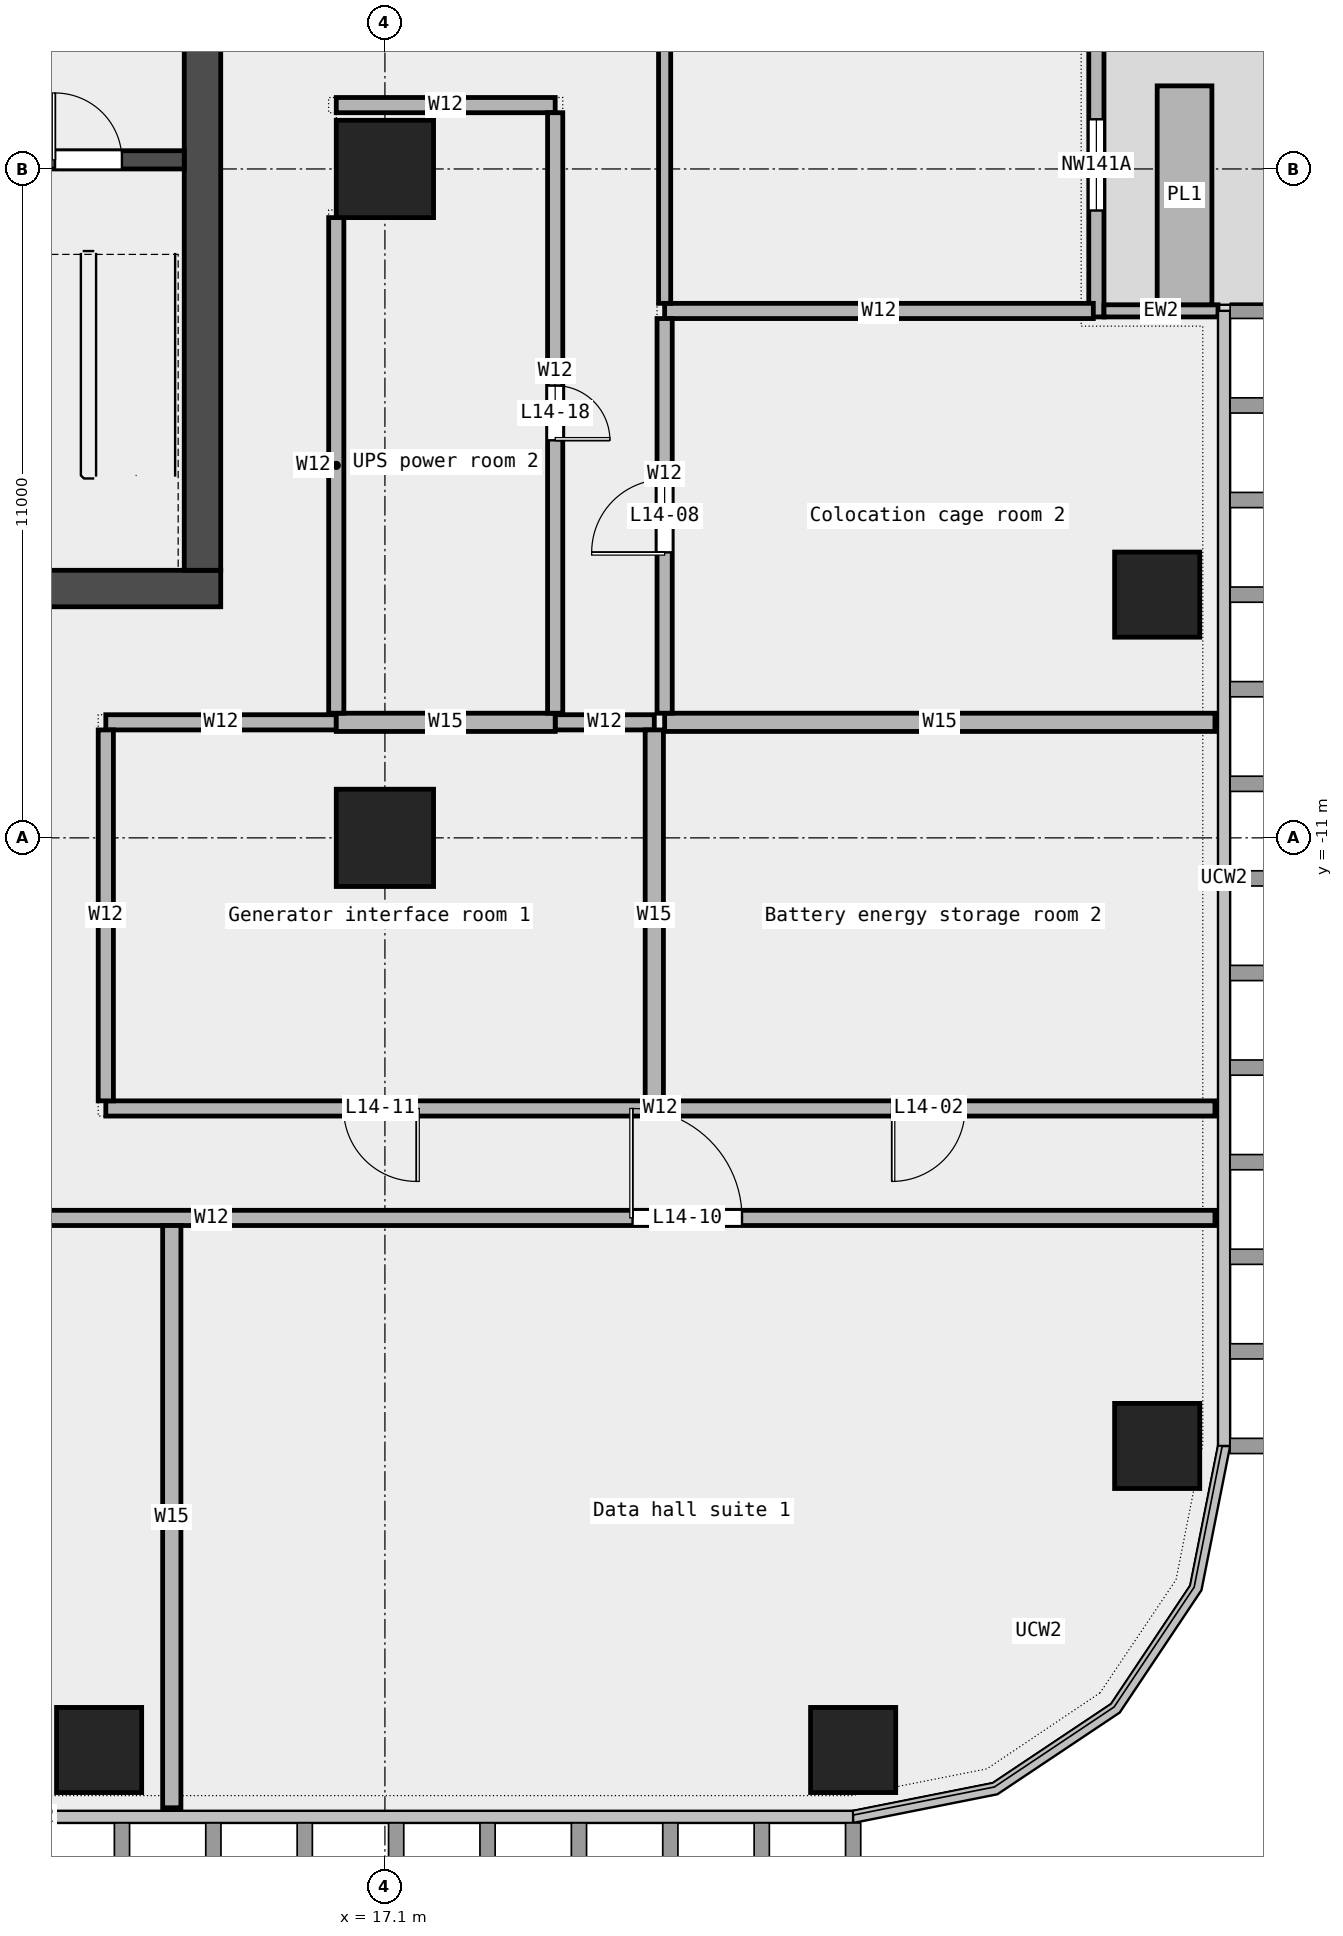
"""IFC4 building model, lengths in metres.
Left out: names, types, materials, properties, quantities, classifications, styles, units other than length and angle.
Written with IfcOpenShell. Run it as: python <this file> out.ifc"""

import sys

from ifc_helpers import new_model, si_unit, direction, frame, frame_2d, origin, origin_2d, place, context, subcontext, project, spatial, rectangle, extrude, element, fill, save


model = new_model("IFC4")
c1 = context("Model", 3, precision=1e-05, world=origin(), true_north=direction((0.0, 1.0)))
c2 = subcontext(c1, "Body", "Model", "MODEL_VIEW")
j1 = project(units=[si_unit("LENGTHUNIT", "METRE"), si_unit("PLANEANGLEUNIT", "RADIAN")], contexts=[c1])
p1 = place(None, origin())
s1 = spatial("IfcSite", under=j1, at=p1, CompositionType="ELEMENT")
p2 = place(p1, origin())
s2 = spatial("IfcBuilding", under=s1, at=p2, CompositionType="ELEMENT")
p3 = place(p2, frame((0.0, 0.0, 74.2)))
s3 = spatial("IfcBuildingStorey", under=s2, at=p3, CompositionType="ELEMENT", Elevation=74.2)
for number, where, z_axis, x_axis in (
    (1, (12.4, -26.0, 0.0), (0.0, 0.0, 1.0), (1.0, 0.0, 0.0)),
    (2, (24.8, -26.0, 0.0), (0.0, 0.0, 1.0), (1.0, 0.0, 0.0)),
    (3, (29.8, -21.0, 0.0), (0.0, 0.0, 1.0), (1.0, 0.0, 0.0)),
    (4, (29.8, -7.0, 0.0), (0.0, 0.0, 1.0), (1.0, 0.0, 0.0)),
):
    element("IfcColumn", number, at=place(p3, frame(where, z_axis=z_axis, x_axis=x_axis)), inside=s3, PredefinedType="COLUMN", context=c2, shape_type="SweptSolid", body=[
        extrude(rectangle(XDim=1.4, YDim=1.4, at=origin_2d()), origin(), (0.0, 0.0, 1.0), 4.35),
    ])
for number, where, z_axis, x_axis in (
    (5, (17.1, -11.0, 0.0), (0.0, 0.0, 1.0), (1.0, 0.0, 0.0)),
    (6, (17.1, 0.0, 0.0), (0.0, 0.0, 1.0), (1.0, 0.0, 0.0)),
):
    element("IfcColumn", number, at=place(p3, frame(where, z_axis=z_axis, x_axis=x_axis)), inside=s3, PredefinedType="COLUMN", context=c2, shape_type="SweptSolid", body=[
        extrude(rectangle(XDim=1.6, YDim=1.6, at=origin_2d()), origin(), (0.0, 0.0, 1.0), 4.35),
    ])
p4 = place(p3, frame((28.8, -2.433, 0.0), z_axis=(0.0, 0.0, 1.0), x_axis=(0.0, 1.0, 0.0)))
e7 = element("IfcWall", 7, at=p4, inside=s3, PredefinedType="STANDARD", context=c2, shape_type="SweptSolid", body=[
    extrude(rectangle(XDim=14.2, YDim=0.25, at=frame_2d((7.1, 0.0))), origin(), (0.0, 0.0, 1.0), 4.35),
])
p5 = place(p4, frame((1.75, 0.0, 0.45)))
e8 = element("IfcOpeningElement", 8, at=p5, cuts=e7, PredefinedType="OPENING", context=c2, shape_type="SweptSolid", body=[
    extrude(rectangle(XDim=1.5, YDim=3.0, at=frame_2d((0.75, 1.5))), frame((0.0, 0.137, 0.0), z_axis=(0.0, -1.0, 0.0), x_axis=(1.0, 0.0, 0.0)), (0.0, 0.0, 1.0), 0.274),
])
p6 = place(p4, frame((6.25, 0.0, 0.0)))
e9 = element("IfcOpeningElement", 9, at=p6, cuts=e7, PredefinedType="OPENING", context=c2, shape_type="SweptSolid", body=[
    extrude(rectangle(XDim=1.8, YDim=2.4, at=frame_2d((0.9, 1.2))), frame((0.0, 0.137, 0.0), z_axis=(0.0, -1.0, 0.0), x_axis=(1.0, 0.0, 0.0)), (0.0, 0.0, 1.0), 0.274),
])
p7 = place(p4, frame((11.0, 0.0, 0.45)))
e10 = element("IfcOpeningElement", 10, at=p7, cuts=e7, PredefinedType="OPENING", context=c2, shape_type="SweptSolid", body=[
    extrude(rectangle(XDim=1.5, YDim=3.0, at=frame_2d((0.75, 1.5))), frame((0.0, 0.137, 0.0), z_axis=(0.0, -1.0, 0.0), x_axis=(1.0, 0.0, 0.0)), (0.0, 0.0, 1.0), 0.274),
])
p8 = place(p3, frame((30.8, -2.333, 0.0), z_axis=(0.0, 0.0, 1.0), x_axis=(-1.0, 0.0, 0.0)))
e11 = element("IfcWall", 11, at=p8, inside=s3, PredefinedType="STANDARD", context=c2, shape_type="SweptSolid", body=[
    extrude(rectangle(XDim=1.875, YDim=0.2, at=frame_2d((0.938, 0.0))), origin(), (0.0, 0.0, 1.0), 4.35),
])
p9 = place(p3, frame((30.25, -2.233, 0.0), z_axis=(0.0, 0.0, 1.0), x_axis=(0.0, 1.0, 0.0)))
e12 = element("IfcWall", 12, at=p9, inside=s3, PredefinedType="STANDARD", context=c2, shape_type="SweptSolid", body=[
    extrude(rectangle(XDim=3.6, YDim=0.9, at=frame_2d((1.8, 0.0))), origin(), (0.0, 0.0, 1.0), 0.7),
])
p10 = place(p3, frame((-2.255, -17.25, 0.0), z_axis=(0.0, 0.0, 1.0), x_axis=(1.0, 0.0, 0.0)))
e13 = element("IfcWall", 13, at=p10, inside=s3, PredefinedType="PARTITIONING", context=c2, shape_type="SweptSolid", body=[
    extrude(rectangle(XDim=33.005, YDim=0.25, at=frame_2d((16.502, 0.0))), origin(), (0.0, 0.0, 1.0), 4.35),
])
p11 = place(p10, frame((7.025, 0.0, 0.0)))
e14 = element("IfcOpeningElement", 14, at=p11, cuts=e13, PredefinedType="OPENING", context=c2, shape_type="SweptSolid", body=[
    extrude(rectangle(XDim=1.8, YDim=2.1, at=frame_2d((0.9, 1.05))), frame((0.0, 0.137, 0.0), z_axis=(0.0, -1.0, 0.0), x_axis=(1.0, 0.0, 0.0)), (0.0, 0.0, 1.0), 0.274),
])
p12 = place(p10, frame((23.427, 0.0, 0.0)))
e15 = element("IfcOpeningElement", 15, at=p12, cuts=e13, PredefinedType="OPENING", context=c2, shape_type="SweptSolid", body=[
    extrude(rectangle(XDim=1.8, YDim=2.1, at=frame_2d((0.9, 1.05))), frame((0.0, 0.137, 0.0), z_axis=(0.0, -1.0, 0.0), x_axis=(1.0, 0.0, 0.0)), (0.0, 0.0, 1.0), 0.274),
])
p13 = place(p3, frame((12.51, -15.45, 0.0), z_axis=(0.0, 0.0, 1.0), x_axis=(1.0, 0.0, 0.0)))
e16 = element("IfcWall", 16, at=p13, inside=s3, PredefinedType="PARTITIONING", context=c2, shape_type="SweptSolid", body=[
    extrude(rectangle(XDim=18.24, YDim=0.25, at=frame_2d((9.12, 0.0))), origin(), (0.0, 0.0, 1.0), 4.35),
])
p14 = place(p13, frame((12.93, 0.0, 0.0)))
e17 = element("IfcOpeningElement", 17, at=p14, cuts=e16, PredefinedType="OPENING", context=c2, shape_type="SweptSolid", body=[
    extrude(rectangle(XDim=1.2, YDim=2.1, at=frame_2d((0.6, 1.05))), frame((0.0, 0.137, 0.0), z_axis=(0.0, -1.0, 0.0), x_axis=(1.0, 0.0, 0.0)), (0.0, 0.0, 1.0), 0.274),
])
p15 = place(p13, frame((3.91, 0.0, 0.0)))
e18 = element("IfcOpeningElement", 18, at=p15, cuts=e16, PredefinedType="OPENING", context=c2, shape_type="SweptSolid", body=[
    extrude(rectangle(XDim=1.2, YDim=2.1, at=frame_2d((0.6, 1.05))), frame((0.0, 0.137, 0.0), z_axis=(0.0, -1.0, 0.0), x_axis=(1.0, 0.0, 0.0)), (0.0, 0.0, 1.0), 0.274),
])
p16 = place(p3, frame((12.51, -9.1, 0.0), z_axis=(0.0, 0.0, 1.0), x_axis=(1.0, 0.0, 0.0)))
e19 = element("IfcWall", 19, at=p16, inside=s3, PredefinedType="PARTITIONING", context=c2, shape_type="SweptSolid", body=[
    extrude(rectangle(XDim=3.79, YDim=0.25, at=frame_2d((1.895, 0.0))), origin(), (0.0, 0.0, 1.0), 4.35),
])
p17 = place(p3, frame((19.9, -9.1, 0.0), z_axis=(0.0, 0.0, 1.0), x_axis=(1.0, 0.0, 0.0)))
e20 = element("IfcWall", 20, at=p17, inside=s3, PredefinedType="PARTITIONING", context=c2, shape_type="SweptSolid", body=[
    extrude(rectangle(XDim=1.63, YDim=0.25, at=frame_2d((0.815, 0.0))), origin(), (0.0, 0.0, 1.0), 4.35),
])
p18 = place(p3, frame((16.3, -9.1, 0.0), z_axis=(0.0, 0.0, 1.0), x_axis=(1.0, 0.0, 0.0)))
e21 = element("IfcWall", 21, at=p18, inside=s3, PredefinedType="PARTITIONING", context=c2, shape_type="SweptSolid", body=[
    extrude(rectangle(XDim=3.6, YDim=0.3, at=frame_2d((1.8, 0.0))), origin(), (0.0, 0.0, 1.0), 4.35),
])
p19 = place(p3, frame((21.7, -9.1, 0.0), z_axis=(0.0, 0.0, 1.0), x_axis=(1.0, 0.0, 0.0)))
e22 = element("IfcWall", 22, at=p19, inside=s3, PredefinedType="PARTITIONING", context=c2, shape_type="SweptSolid", body=[
    extrude(rectangle(XDim=9.05, YDim=0.3, at=frame_2d((4.525, 0.0))), origin(), (0.0, 0.0, 1.0), 4.35),
])
p20 = place(p3, frame((21.7, -2.335, 0.0), z_axis=(0.0, 0.0, 1.0), x_axis=(1.0, 0.0, 0.0)))
e23 = element("IfcWall", 23, at=p20, inside=s3, PredefinedType="PARTITIONING", context=c2, shape_type="SweptSolid", body=[
    extrude(rectangle(XDim=7.05, YDim=0.25, at=frame_2d((3.525, 0.0))), origin(), (0.0, 0.0, 1.0), 4.35),
])
p21 = place(p3, frame((16.3, 1.05, 0.0), z_axis=(0.0, 0.0, 1.0), x_axis=(1.0, 0.0, 0.0)))
e24 = element("IfcWall", 24, at=p21, inside=s3, PredefinedType="PARTITIONING", context=c2, shape_type="SweptSolid", body=[
    extrude(rectangle(XDim=3.6, YDim=0.25, at=frame_2d((1.8, 0.0))), origin(), (0.0, 0.0, 1.0), 4.35),
])
p22 = place(p3, frame((12.51, -15.325, 0.0), z_axis=(0.0, 0.0, 1.0), x_axis=(0.0, 1.0, 0.0)))
e25 = element("IfcWall", 25, at=p22, inside=s3, PredefinedType="PARTITIONING", context=c2, shape_type="SweptSolid", body=[
    extrude(rectangle(XDim=6.1, YDim=0.25, at=frame_2d((3.05, 0.0))), origin(), (0.0, 0.0, 1.0), 4.35),
])
p23 = place(p3, frame((13.595, -26.95, 0.0), z_axis=(0.0, 0.0, 1.0), x_axis=(0.0, 1.0, 0.0)))
e26 = element("IfcWall", 26, at=p23, inside=s3, PredefinedType="PARTITIONING", context=c2, shape_type="SweptSolid", body=[
    extrude(rectangle(XDim=9.575, YDim=0.3, at=frame_2d((4.788, 0.0))), origin(), (0.0, 0.0, 1.0), 4.35),
])
p24 = place(p3, frame((16.3, -8.95, 0.0), z_axis=(0.0, 0.0, 1.0), x_axis=(0.0, 1.0, 0.0)))
e27 = element("IfcWall", 27, at=p24, inside=s3, PredefinedType="PARTITIONING", context=c2, shape_type="SweptSolid", body=[
    extrude(rectangle(XDim=8.15, YDim=0.25, at=frame_2d((4.075, 0.0))), origin(), (0.0, 0.0, 1.0), 4.35),
])
p25 = place(p3, frame((19.9, -8.95, 0.0), z_axis=(0.0, 0.0, 1.0), x_axis=(0.0, 1.0, 0.0)))
e28 = element("IfcWall", 28, at=p25, inside=s3, PredefinedType="PARTITIONING", context=c2, shape_type="SweptSolid", body=[
    extrude(rectangle(XDim=9.875, YDim=0.25, at=frame_2d((4.938, 0.0))), origin(), (0.0, 0.0, 1.0), 4.35),
])
p26 = place(p25, frame((4.488, 0.0, 0.0)))
e29 = element("IfcOpeningElement", 29, at=p26, cuts=e28, PredefinedType="OPENING", context=c2, shape_type="SweptSolid", body=[
    extrude(rectangle(XDim=0.9, YDim=2.1, at=frame_2d((0.45, 1.05))), frame((0.0, 0.137, 0.0), z_axis=(0.0, -1.0, 0.0), x_axis=(1.0, 0.0, 0.0)), (0.0, 0.0, 1.0), 0.274),
])
p27 = place(p3, frame((21.53, -15.325, 0.0), z_axis=(0.0, 0.0, 1.0), x_axis=(0.0, 1.0, 0.0)))
e30 = element("IfcWall", 30, at=p27, inside=s3, PredefinedType="PARTITIONING", context=c2, shape_type="SweptSolid", body=[
    extrude(rectangle(XDim=6.1, YDim=0.3, at=frame_2d((3.05, 0.0))), origin(), (0.0, 0.0, 1.0), 4.35),
])
p28 = place(p3, frame((21.7, -2.21, 0.0), z_axis=(0.0, 0.0, 1.0), x_axis=(0.0, 1.0, 0.0)))
e31 = element("IfcWall", 31, at=p28, inside=s3, PredefinedType="PARTITIONING", context=c2, shape_type="SweptSolid", body=[
    extrude(rectangle(XDim=17.485, YDim=0.2, at=frame_2d((8.742, 0.0))), origin(), (0.0, 0.0, 1.0), 4.35),
])
p29 = place(p28, frame((15.23, 0.0, 0.0)))
e32 = element("IfcOpeningElement", 32, at=p29, cuts=e31, PredefinedType="OPENING", context=c2, shape_type="SweptSolid", body=[
    extrude(rectangle(XDim=0.9, YDim=2.1, at=frame_2d((0.45, 1.05))), frame((0.0, 0.112, 0.0), z_axis=(0.0, -1.0, 0.0), x_axis=(1.0, 0.0, 0.0)), (0.0, 0.0, 1.0), 0.224),
])
p30 = place(p28, frame((6.188, 0.0, 0.0)))
e33 = element("IfcOpeningElement", 33, at=p30, cuts=e31, PredefinedType="OPENING", context=c2, shape_type="SweptSolid", body=[
    extrude(rectangle(XDim=1.5, YDim=2.1, at=frame_2d((0.75, 1.05))), frame((0.0, 0.112, 0.0), z_axis=(0.0, -1.0, 0.0), x_axis=(1.0, 0.0, 0.0)), (0.0, 0.0, 1.0), 0.224),
])
p31 = place(p3, frame((21.7, -8.95, 0.0), z_axis=(0.0, 0.0, 1.0), x_axis=(0.0, 1.0, 0.0)))
e34 = element("IfcWall", 34, at=p31, inside=s3, PredefinedType="PARTITIONING", context=c2, shape_type="SweptSolid", body=[
    extrude(rectangle(XDim=6.49, YDim=0.25, at=frame_2d((3.245, 0.0))), origin(), (0.0, 0.0, 1.0), 4.35),
])
p32 = place(p31, frame((2.645, 0.0, 0.0)))
e35 = element("IfcOpeningElement", 35, at=p32, cuts=e34, PredefinedType="OPENING", context=c2, shape_type="SweptSolid", body=[
    extrude(rectangle(XDim=1.2, YDim=2.1, at=frame_2d((0.6, 1.05))), frame((0.0, 0.137, 0.0), z_axis=(0.0, -1.0, 0.0), x_axis=(1.0, 0.0, 0.0)), (0.0, 0.0, 1.0), 0.274),
])
p33 = place(p3, frame((-14.4, -6.9, 0.0), z_axis=(0.0, 0.0, 1.0), x_axis=(1.0, 0.0, 0.0)))
e36 = element("IfcWall", 36, at=p33, inside=s3, PredefinedType="SHEAR", context=c2, shape_type="SweptSolid", body=[
    extrude(rectangle(XDim=28.8, YDim=0.6, at=frame_2d((14.4, 0.0))), origin(), (0.0, 0.0, 1.0), 4.5),
])
p34 = place(p33, frame((6.675, 0.0, 0.0)))
e37 = element("IfcOpeningElement", 37, at=p34, cuts=e36, PredefinedType="OPENING", context=c2, shape_type="SweptSolid", body=[
    extrude(rectangle(XDim=1.2, YDim=2.1, at=frame_2d((0.6, 1.05))), frame((0.0, 0.312, 0.0), z_axis=(0.0, -1.0, 0.0), x_axis=(1.0, 0.0, 0.0)), (0.0, 0.0, 1.0), 0.624),
])
p35 = place(p33, frame((11.837, 0.0, 0.0)))
e38 = element("IfcOpeningElement", 38, at=p35, cuts=e36, PredefinedType="OPENING", context=c2, shape_type="SweptSolid", body=[
    extrude(rectangle(XDim=1.0, YDim=2.1, at=frame_2d((0.5, 1.05))), frame((0.0, 0.312, 0.0), z_axis=(0.0, -1.0, 0.0), x_axis=(1.0, 0.0, 0.0)), (0.0, 0.0, 1.0), 0.624),
])
p36 = place(p33, frame((15.025, 0.0, 0.0)))
e39 = element("IfcOpeningElement", 39, at=p36, cuts=e36, PredefinedType="OPENING", context=c2, shape_type="SweptSolid", body=[
    extrude(rectangle(XDim=1.0, YDim=2.1, at=frame_2d((0.5, 1.05))), frame((0.0, 0.312, 0.0), z_axis=(0.0, -1.0, 0.0), x_axis=(1.0, 0.0, 0.0)), (0.0, 0.0, 1.0), 0.624),
])
p37 = place(p33, frame((18.75, 0.0, 0.0)))
e40 = element("IfcOpeningElement", 40, at=p37, cuts=e36, PredefinedType="OPENING", context=c2, shape_type="SweptSolid", body=[
    extrude(rectangle(XDim=1.8, YDim=2.1, at=frame_2d((0.9, 1.05))), frame((0.0, 0.312, 0.0), z_axis=(0.0, -1.0, 0.0), x_axis=(1.0, 0.0, 0.0)), (0.0, 0.0, 1.0), 0.624),
])
p38 = place(p33, frame((23.087, 0.0, 0.0)))
e41 = element("IfcOpeningElement", 41, at=p38, cuts=e36, PredefinedType="OPENING", context=c2, shape_type="SweptSolid", body=[
    extrude(rectangle(XDim=1.0, YDim=2.1, at=frame_2d((0.5, 1.05))), frame((0.0, 0.312, 0.0), z_axis=(0.0, -1.0, 0.0), x_axis=(1.0, 0.0, 0.0)), (0.0, 0.0, 1.0), 0.624),
])
p39 = place(p3, frame((14.1, -6.6, 0.0), z_axis=(0.0, 0.0, 1.0), x_axis=(0.0, 1.0, 0.0)))
e42 = element("IfcWall", 42, at=p39, inside=s3, PredefinedType="SHEAR", context=c2, shape_type="SweptSolid", body=[
    extrude(rectangle(XDim=19.5, YDim=0.6, at=frame_2d((9.75, 0.0))), origin(), (0.0, 0.0, 1.0), 4.5),
])
p40 = place(p39, frame((9.3, 0.0, 0.0)))
e43 = element("IfcOpeningElement", 43, at=p40, cuts=e42, PredefinedType="OPENING", context=c2, shape_type="SweptSolid", body=[
    extrude(rectangle(XDim=1.8, YDim=2.1, at=frame_2d((0.9, 1.05))), frame((0.0, 0.312, 0.0), z_axis=(0.0, -1.0, 0.0), x_axis=(1.0, 0.0, 0.0)), (0.0, 0.0, 1.0), 0.624),
])
p41 = place(p3, frame((10.65, 0.15, 0.0), z_axis=(0.0, 0.0, 1.0), x_axis=(1.0, 0.0, 0.0)))
e44 = element("IfcWall", 44, at=p41, inside=s3, PredefinedType="SOLIDWALL", context=c2, shape_type="SweptSolid", body=[
    extrude(rectangle(XDim=3.15, YDim=0.3, at=frame_2d((1.575, 0.0))), origin(), (0.0, 0.0, 1.0), 4.5),
])
p42 = place(p41, frame((1.025, 0.0, 0.0)))
e45 = element("IfcOpeningElement", 45, at=p42, cuts=e44, PredefinedType="OPENING", context=c2, shape_type="SweptSolid", body=[
    extrude(rectangle(XDim=1.1, YDim=2.1, at=frame_2d((0.55, 1.05))), frame((0.0, 0.162, 0.0), z_axis=(0.0, -1.0, 0.0), x_axis=(1.0, 0.0, 0.0)), (0.0, 0.0, 1.0), 0.324),
])
p43 = place(p5, origin())
e46 = element("IfcWindow", 46, at=p43, inside=s3, PartitioningType="SINGLE_PANEL", PredefinedType="WINDOW", context=c2, shape_type="SweptSolid", body=[
    extrude(rectangle(XDim=1.5, YDim=3.0, at=frame_2d((0.75, 1.5))), frame((0.0, 0.03, 0.0), z_axis=(0.0, -1.0, 0.0), x_axis=(1.0, 0.0, 0.0)), (0.0, 0.0, 1.0), 0.06),
])
fill(e8, e46)
p44 = place(p14, origin())
e47 = element("IfcDoor", 47, at=p44, inside=s3, OperationType="SINGLE_SWING_RIGHT", PredefinedType="DOOR", context=c2, shape_type="SweptSolid", body=[
    extrude(rectangle(XDim=1.2, YDim=2.1, at=frame_2d((0.6, 1.05))), frame((0.0, 0.025, 0.0), z_axis=(0.0, -1.0, 0.0), x_axis=(1.0, 0.0, 0.0)), (0.0, 0.0, 1.0), 0.05),
])
fill(e17, e47)
p45 = place(p32, origin())
e48 = element("IfcDoor", 48, at=p45, inside=s3, OperationType="SINGLE_SWING_LEFT", PredefinedType="DOOR", context=c2, shape_type="SweptSolid", body=[
    extrude(rectangle(XDim=1.2, YDim=2.1, at=frame_2d((0.6, 1.05))), frame((0.0, 0.025, 0.0), z_axis=(0.0, -1.0, 0.0), x_axis=(1.0, 0.0, 0.0)), (0.0, 0.0, 1.0), 0.05),
])
fill(e35, e48)
p46 = place(p12, origin())
e49 = element("IfcDoor", 49, at=p46, inside=s3, OperationType="DOUBLE_DOOR_SINGLE_SWING", PredefinedType="DOOR", context=c2, shape_type="SweptSolid", body=[
    extrude(rectangle(XDim=1.8, YDim=2.1, at=frame_2d((0.9, 1.05))), frame((0.0, 0.025, 0.0), z_axis=(0.0, -1.0, 0.0), x_axis=(1.0, 0.0, 0.0)), (0.0, 0.0, 1.0), 0.05),
])
fill(e15, e49)
p47 = place(p15, origin())
e50 = element("IfcDoor", 50, at=p47, inside=s3, OperationType="SINGLE_SWING_LEFT", PredefinedType="DOOR", context=c2, shape_type="SweptSolid", body=[
    extrude(rectangle(XDim=1.2, YDim=2.1, at=frame_2d((0.6, 1.05))), frame((0.0, 0.025, 0.0), z_axis=(0.0, -1.0, 0.0), x_axis=(1.0, 0.0, 0.0)), (0.0, 0.0, 1.0), 0.05),
])
fill(e18, e50)
p48 = place(p26, origin())
e51 = element("IfcDoor", 51, at=p48, inside=s3, OperationType="SINGLE_SWING_RIGHT", PredefinedType="DOOR", context=c2, shape_type="SweptSolid", body=[
    extrude(rectangle(XDim=0.9, YDim=2.1, at=frame_2d((0.45, 1.05))), frame((0.0, 0.025, 0.0), z_axis=(0.0, -1.0, 0.0), x_axis=(1.0, 0.0, 0.0)), (0.0, 0.0, 1.0), 0.05),
])
fill(e29, e51)
p49 = place(p42, origin())
e52 = element("IfcDoor", 52, at=p49, inside=s3, OperationType="SINGLE_SWING_RIGHT", PredefinedType="DOOR", context=c2, shape_type="SweptSolid", body=[
    extrude(rectangle(XDim=1.1, YDim=2.1, at=frame_2d((0.55, 1.05))), frame((0.0, 0.025, 0.0), z_axis=(0.0, -1.0, 0.0), x_axis=(1.0, 0.0, 0.0)), (0.0, 0.0, 1.0), 0.05),
])
fill(e45, e52)
save(model, sys.argv[1])
